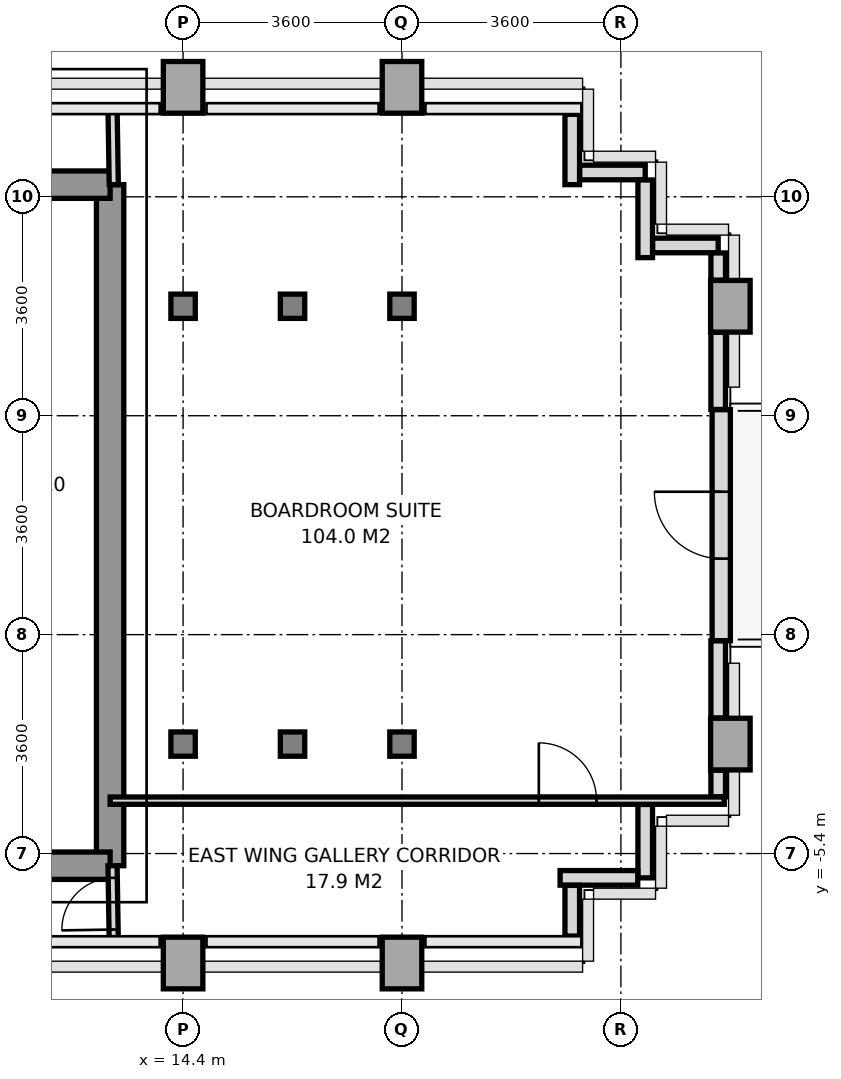
"""IFC4 building model, lengths in metres.
Left out: names, types, materials, properties, quantities, classifications, styles, units other than length and angle.
Written with IfcOpenShell. Run it as: python <this file> out.ifc"""

import sys

from ifc_helpers import new_model, si_unit, direction, frame, frame_2d, origin, origin_2d, place, context, subcontext, project, spatial, rectangle, i_section, extrude, source, transform, mapped, element, fill, save


model = new_model("IFC4")
c1 = context("Model", 3, precision=1e-05, world=origin(), true_north=direction((0.0, 1.0)))
c2 = subcontext(c1, "Body", "Model", "MODEL_VIEW")
j1 = project(units=[si_unit("LENGTHUNIT", "METRE"), si_unit("PLANEANGLEUNIT", "RADIAN")], contexts=[c1])
p1 = place(None, origin())
s1 = spatial("IfcSite", under=j1, at=p1, CompositionType="ELEMENT")
p2 = place(p1, origin())
s2 = spatial("IfcBuilding", under=s1, at=p2, CompositionType="ELEMENT")
p3 = place(p2, frame((0.0, 0.0, 104.0)))
s3 = spatial("IfcBuildingStorey", under=s2, at=p3, CompositionType="ELEMENT", Elevation=104.0)
m1 = source(origin(), c2, "Body", "SweptSolid", [
    extrude(rectangle(XDim=0.65, YDim=0.85, at=origin_2d()), origin(), (0.0, 0.0, 1.0), 3.2),
])
p4 = place(p3, frame((14.4, -7.2, 0.0), z_axis=(0.0, 0.0, 1.0), x_axis=(1.0, 0.0, 0.0)))
e1 = element("IfcColumn", 1, at=p4, inside=s3, PredefinedType="COLUMN", context=c2, shape_type="MappedRepresentation", body=[
    mapped(m1, transform((0.0, 0.0, 0.0), x_axis=(1.0, 0.0, 0.0), y_axis=(0.0, 1.0, 0.0), z_axis=(0.0, 0.0, 1.0), scale=1.0)),
])
m2 = source(origin(), c2, "Body", "SweptSolid", [
    extrude(i_section(OverallWidth=0.401, OverallDepth=0.399, WebThickness=0.02, FlangeThickness=0.032, at=origin_2d()), origin(), (0.0, 0.0, 1.0), 3.2),
])
for number, where, z_axis, x_axis in (
    (2, (14.4, -3.6, 0.0), (0.0, 0.0, 1.0), (1.0, 0.0, 0.0)),
    (3, (14.4, 3.6, 0.0), (0.0, 0.0, 1.0), (1.0, 0.0, 0.0)),
):
    element("IfcColumn", number, at=place(p3, frame(where, z_axis=z_axis, x_axis=x_axis)), inside=s3, PredefinedType="COLUMN", context=c2, shape_type="MappedRepresentation", body=[
        mapped(m2, transform((0.0, 0.0, 0.0), x_axis=(1.0, 0.0, 0.0), y_axis=(0.0, 1.0, 0.0), z_axis=(0.0, 0.0, 1.0), scale=1.0)),
    ])
p5 = place(p3, frame((14.4, 7.2, 0.0), z_axis=(0.0, 0.0, 1.0), x_axis=(1.0, 0.0, 0.0)))
e4 = element("IfcColumn", 4, at=p5, inside=s3, PredefinedType="COLUMN", context=c2, shape_type="MappedRepresentation", body=[
    mapped(m1, transform((0.0, 0.0, 0.0), x_axis=(1.0, 0.0, 0.0), y_axis=(0.0, 1.0, 0.0), z_axis=(0.0, 0.0, 1.0), scale=1.0)),
])
for number, where, z_axis, x_axis in (
    (5, (16.2, -3.6, 0.0), (0.0, 0.0, 1.0), (1.0, 0.0, 0.0)),
    (6, (16.2, 3.6, 0.0), (0.0, 0.0, 1.0), (1.0, 0.0, 0.0)),
):
    element("IfcColumn", number, at=place(p3, frame(where, z_axis=z_axis, x_axis=x_axis)), inside=s3, PredefinedType="COLUMN", context=c2, shape_type="MappedRepresentation", body=[
        mapped(m2, transform((0.0, 0.0, 0.0), x_axis=(1.0, 0.0, 0.0), y_axis=(0.0, 1.0, 0.0), z_axis=(0.0, 0.0, 1.0), scale=1.0)),
    ])
p6 = place(p3, frame((18.0, -7.2, 0.0), z_axis=(0.0, 0.0, 1.0), x_axis=(1.0, 0.0, 0.0)))
e7 = element("IfcColumn", 7, at=p6, inside=s3, PredefinedType="COLUMN", context=c2, shape_type="MappedRepresentation", body=[
    mapped(m1, transform((0.0, 0.0, 0.0), x_axis=(1.0, 0.0, 0.0), y_axis=(0.0, 1.0, 0.0), z_axis=(0.0, 0.0, 1.0), scale=1.0)),
])
for number, where, z_axis, x_axis in (
    (8, (18.0, -3.6, 0.0), (0.0, 0.0, 1.0), (1.0, 0.0, 0.0)),
    (9, (18.0, 3.6, 0.0), (0.0, 0.0, 1.0), (1.0, 0.0, 0.0)),
):
    element("IfcColumn", number, at=place(p3, frame(where, z_axis=z_axis, x_axis=x_axis)), inside=s3, PredefinedType="COLUMN", context=c2, shape_type="MappedRepresentation", body=[
        mapped(m2, transform((0.0, 0.0, 0.0), x_axis=(1.0, 0.0, 0.0), y_axis=(0.0, 1.0, 0.0), z_axis=(0.0, 0.0, 1.0), scale=1.0)),
    ])
for number, where, z_axis, x_axis in (
    (10, (18.0, 7.2, 0.0), (0.0, 0.0, 1.0), (1.0, 0.0, 0.0)),
    (11, (23.4, -3.6, 0.0), (0.0, 0.0, 1.0), (1.0, 0.0, 0.0)),
    (12, (23.4, 3.6, 0.0), (0.0, 0.0, 1.0), (1.0, 0.0, 0.0)),
):
    element("IfcColumn", number, at=place(p3, frame(where, z_axis=z_axis, x_axis=x_axis)), inside=s3, PredefinedType="COLUMN", context=c2, shape_type="MappedRepresentation", body=[
        mapped(m1, transform((0.0, 0.0, 0.0), x_axis=(1.0, 0.0, 0.0), y_axis=(0.0, 1.0, 0.0), z_axis=(0.0, 0.0, 1.0), scale=1.0)),
    ])
p7 = place(p3, frame((23.25, -1.9, 0.0), z_axis=(0.0, 0.0, 1.0), x_axis=(0.0, 1.0, 0.0)))
e13 = element("IfcWall", 13, at=p7, inside=s3, PredefinedType="SOLIDWALL", context=c2, shape_type="SweptSolid", body=[
    extrude(rectangle(XDim=3.8, YDim=0.3, at=frame_2d((1.9, 0.0))), origin(), (0.0, 0.0, 1.0), 2.45),
])
p8 = place(p7, frame((1.35, 0.0, 0.0)))
e14 = element("IfcOpeningElement", 14, at=p8, cuts=e13, PredefinedType="OPENING", context=c2, shape_type="SweptSolid", body=[
    extrude(rectangle(XDim=1.1, YDim=2.3, at=frame_2d((0.55, 1.15))), frame((0.0, 0.16, 0.0), z_axis=(0.0, -1.0, 0.0), x_axis=(1.0, 0.0, 0.0)), (0.0, 0.0, 1.0), 0.32),
])
p9 = place(p3, frame((22.0, -4.593, 0.0), z_axis=(0.0, 0.0, 1.0), x_axis=(0.0, -1.0, 0.0)))
e15 = element("IfcWall", 15, at=p9, inside=s3, PredefinedType="PARAPET", context=c2, shape_type="SweptSolid", body=[
    extrude(rectangle(XDim=1.207, YDim=0.24, at=frame_2d((0.604, 0.0))), origin(), (0.0, 0.0, 1.0), 1.15),
])
p10 = place(p3, frame((21.877, -5.8, 0.0), z_axis=(0.0, 0.0, 1.0), x_axis=(-1.0, 0.0, 0.0)))
e16 = element("IfcWall", 16, at=p10, inside=s3, PredefinedType="PARAPET", context=c2, shape_type="SweptSolid", body=[
    extrude(rectangle(XDim=1.277, YDim=0.24, at=frame_2d((0.638, 0.0))), origin(), (0.0, 0.0, 1.0), 1.15),
])
p11 = place(p3, frame((20.8, -5.923, 0.0), z_axis=(0.0, 0.0, 1.0), x_axis=(0.0, -1.0, 0.0)))
e17 = element("IfcWall", 17, at=p11, inside=s3, PredefinedType="PARAPET", context=c2, shape_type="SweptSolid", body=[
    extrude(rectangle(XDim=0.834, YDim=0.24, at=frame_2d((0.417, 0.0))), origin(), (0.0, 0.0, 1.0), 1.15),
])
p12 = place(p3, frame((20.8, 6.757, 0.0), z_axis=(0.0, 0.0, 1.0), x_axis=(0.0, -1.0, 0.0)))
e18 = element("IfcWall", 18, at=p12, inside=s3, PredefinedType="PARAPET", context=c2, shape_type="SweptSolid", body=[
    extrude(rectangle(XDim=1.157, YDim=0.24, at=frame_2d((0.579, 0.0))), origin(), (0.0, 0.0, 1.0), 1.15),
])
p13 = place(p3, frame((20.923, 5.8, 0.0), z_axis=(0.0, 0.0, 1.0), x_axis=(1.0, 0.0, 0.0)))
e19 = element("IfcWall", 19, at=p13, inside=s3, PredefinedType="PARAPET", context=c2, shape_type="SweptSolid", body=[
    extrude(rectangle(XDim=1.077, YDim=0.24, at=frame_2d((0.539, 0.0))), origin(), (0.0, 0.0, 1.0), 1.15),
])
p14 = place(p3, frame((22.0, 5.677, 0.0), z_axis=(0.0, 0.0, 1.0), x_axis=(0.0, -1.0, 0.0)))
e20 = element("IfcWall", 20, at=p14, inside=s3, PredefinedType="PARAPET", context=c2, shape_type="SweptSolid", body=[
    extrude(rectangle(XDim=1.277, YDim=0.24, at=frame_2d((0.639, 0.0))), origin(), (0.0, 0.0, 1.0), 1.15),
])
p15 = place(p3, frame((22.123, 4.6, 0.0), z_axis=(0.0, 0.0, 1.0), x_axis=(1.0, 0.0, 0.0)))
e21 = element("IfcWall", 21, at=p15, inside=s3, PredefinedType="PARAPET", context=c2, shape_type="SweptSolid", body=[
    extrude(rectangle(XDim=1.077, YDim=0.24, at=frame_2d((0.539, 0.0))), origin(), (0.0, 0.0, 1.0), 1.15),
])
p16 = place(p3, frame((23.2, 4.477, 0.0), z_axis=(0.0, 0.0, 1.0), x_axis=(0.0, -1.0, 0.0)))
e22 = element("IfcWall", 22, at=p16, inside=s3, PredefinedType="PARAPET", context=c2, shape_type="SweptSolid", body=[
    extrude(rectangle(XDim=0.449, YDim=0.24, at=frame_2d((0.225, 0.0))), origin(), (0.0, 0.0, 1.0), 1.15),
])
for number, where, z_axis, x_axis in (
    (23, (23.2, 3.172, 0.0), (0.0, 0.0, 1.0), (0.0, -1.0, 0.0)),
    (24, (23.2, -1.903, 0.0), (0.0, 0.0, 1.0), (0.0, -1.0, 0.0)),
):
    element("IfcWall", number, at=place(p3, frame(where, z_axis=z_axis, x_axis=x_axis)), inside=s3, PredefinedType="PARAPET", context=c2, shape_type="SweptSolid", body=[
        extrude(rectangle(XDim=1.269, YDim=0.24, at=frame_2d((0.635, 0.0))), origin(), (0.0, 0.0, 1.0), 1.15),
    ])
p17 = place(p3, frame((23.2, -4.028, 0.0), z_axis=(0.0, 0.0, 1.0), x_axis=(0.0, -1.0, 0.0)))
e25 = element("IfcWall", 25, at=p17, inside=s3, PredefinedType="PARAPET", context=c2, shape_type="SweptSolid", body=[
    extrude(rectangle(XDim=0.439, YDim=0.24, at=frame_2d((0.219, 0.0))), origin(), (0.0, 0.0, 1.0), 1.15),
])
p18 = place(p3, frame((13.2, -5.6, 0.0), z_axis=(0.0, 0.0, 1.0), x_axis=(0.0, 1.0, 0.0)))
e26 = element("IfcWall", 26, at=p18, inside=s3, PredefinedType="SHEAR", context=c2, shape_type="SweptSolid", body=[
    extrude(rectangle(XDim=11.2, YDim=0.45, at=frame_2d((5.6, 0.0))), origin(), (0.0, 0.0, 1.0), 3.2),
])
p19 = place(p3, frame((11.381, 5.6, 0.0), z_axis=(0.0, 0.0, 1.0), x_axis=(1.0, 0.0, 0.0)))
e27 = element("IfcWall", 27, at=p19, inside=s3, PredefinedType="SHEAR", context=c2, shape_type="SweptSolid", body=[
    extrude(rectangle(XDim=1.819, YDim=0.45, at=frame_2d((0.909, 0.0))), origin(), (0.0, 0.0, 1.0), 3.2),
])
p20 = place(p3, frame((5.4, -5.6, 0.0), z_axis=(0.0, 0.0, 1.0), x_axis=(1.0, 0.0, 0.0)))
e28 = element("IfcWall", 28, at=p20, inside=s3, PredefinedType="SHEAR", context=c2, shape_type="SweptSolid", body=[
    extrude(rectangle(XDim=7.8, YDim=0.45, at=frame_2d((3.9, 0.0))), origin(), (0.0, 0.0, 1.0), 3.2),
])
p21 = place(p20, frame((3.0, 0.0, 0.0)))
e29 = element("IfcOpeningElement", 29, at=p21, cuts=e28, PredefinedType="OPENING", context=c2, shape_type="SweptSolid", body=[
    extrude(rectangle(XDim=1.2, YDim=2.2, at=frame_2d((0.6, 1.1))), frame((0.0, 0.235, 0.0), z_axis=(0.0, -1.0, 0.0), x_axis=(1.0, 0.0, 0.0)), (0.0, 0.0, 1.0), 0.47),
])
p22 = place(p3, frame((13.26, 5.6, 0.0), z_axis=(0.0, 0.0, 1.0), x_axis=(-0.016013571389, 0.999871774545, 0.0)))
e30 = element("IfcWall", 30, at=p22, inside=s3, PredefinedType="PARTITIONING", context=c2, shape_type="SweptSolid", body=[
    extrude(rectangle(XDim=1.25, YDim=0.15, at=frame_2d((0.625, 0.0))), origin(), (0.0, 0.0, 1.0), 3.2),
])
p23 = place(p3, frame((13.26, -6.85, 0.0), z_axis=(0.0, 0.0, 1.0), x_axis=(-0.016013571389, 0.999871774545, 0.0)))
e31 = element("IfcWall", 31, at=p23, inside=s3, PredefinedType="PARTITIONING", context=c2, shape_type="SweptSolid", body=[
    extrude(rectangle(XDim=1.25, YDim=0.15, at=frame_2d((0.625, 0.0))), origin(), (0.0, 0.0, 1.0), 3.2),
])
p24 = place(p23, frame((0.2, 0.0, 0.0)))
e32 = element("IfcOpeningElement", 32, at=p24, cuts=e31, PredefinedType="OPENING", context=c2, shape_type="SweptSolid", body=[
    extrude(rectangle(XDim=0.85, YDim=2.1, at=frame_2d((0.425, 1.05))), frame((0.0, 0.085, 0.0), z_axis=(0.0, -1.0, 0.0), x_axis=(1.0, 0.0, 0.0)), (0.0, 0.0, 1.0), 0.17),
])
p25 = place(p3, frame((13.2, -4.53, 0.0), z_axis=(0.0, 0.0, 1.0), x_axis=(1.0, 0.0, 0.0)))
e33 = element("IfcWall", 33, at=p25, inside=s3, PredefinedType="PARTITIONING", context=c2, shape_type="SweptSolid", body=[
    extrude(rectangle(XDim=10.1, YDim=0.12, at=frame_2d((5.05, 0.0))), origin(), (0.0, 0.0, 1.0), 2.76),
])
p26 = place(p25, frame((7.05, 0.0, 0.0)))
e34 = element("IfcOpeningElement", 34, at=p26, cuts=e33, PredefinedType="OPENING", context=c2, shape_type="SweptSolid", body=[
    extrude(rectangle(XDim=0.95, YDim=2.15, at=frame_2d((0.475, 1.075))), frame((0.0, 0.07, 0.0), z_axis=(0.0, -1.0, 0.0), x_axis=(1.0, 0.0, 0.0)), (0.0, 0.0, 1.0), 0.14),
])
m3 = source(origin(), c2, "Body", "SweptSolid", [
    extrude(rectangle(XDim=1.1, YDim=2.3, at=frame_2d((0.55, 1.15))), frame((0.0, 0.025, 0.0), z_axis=(0.0, -1.0, 0.0), x_axis=(1.0, 0.0, 0.0)), (0.0, 0.0, 1.0), 0.05),
])
p27 = place(p8, frame((1.1, 0.0, 0.0), z_axis=(0.0, 0.0, 1.0), x_axis=(-1.0, 0.0, 0.0)))
e35 = element("IfcDoor", 35, at=p27, inside=s3, OperationType="SINGLE_SWING_RIGHT", PredefinedType="DOOR", context=c2, shape_type="MappedRepresentation", body=[
    mapped(m3, transform((0.0, 0.0, 0.0), x_axis=(1.0, 0.0, 0.0), y_axis=(0.0, 1.0, 0.0), z_axis=(0.0, 0.0, 1.0), scale=1.0)),
])
fill(e14, e35)
m4 = source(origin(), c2, "Body", "SweptSolid", [
    extrude(rectangle(XDim=0.85, YDim=2.1, at=frame_2d((0.425, 1.05))), frame((0.0, 0.025, 0.0), z_axis=(0.0, -1.0, 0.0), x_axis=(1.0, 0.0, 0.0)), (0.0, 0.0, 1.0), 0.05),
])
p28 = place(p24, origin())
e36 = element("IfcDoor", 36, at=p28, inside=s3, OperationType="SINGLE_SWING_LEFT", PredefinedType="DOOR", context=c2, shape_type="MappedRepresentation", body=[
    mapped(m4, transform((0.0, 0.0, 0.0), x_axis=(1.0, 0.0, 0.0), y_axis=(0.0, 1.0, 0.0), z_axis=(0.0, 0.0, 1.0), scale=1.0)),
])
fill(e32, e36)
m5 = source(origin(), c2, "Body", "SweptSolid", [
    extrude(rectangle(XDim=0.95, YDim=2.15, at=frame_2d((0.475, 1.075))), frame((0.0, 0.025, 0.0), z_axis=(0.0, -1.0, 0.0), x_axis=(1.0, 0.0, 0.0)), (0.0, 0.0, 1.0), 0.05),
])
p29 = place(p26, origin())
e37 = element("IfcDoor", 37, at=p29, inside=s3, OperationType="SINGLE_SWING_LEFT", PredefinedType="DOOR", context=c2, shape_type="MappedRepresentation", body=[
    mapped(m5, transform((0.0, 0.0, 0.0), x_axis=(1.0, 0.0, 0.0), y_axis=(0.0, 1.0, 0.0), z_axis=(0.0, 0.0, 1.0), scale=1.0)),
])
fill(e34, e37)
save(model, sys.argv[1])
